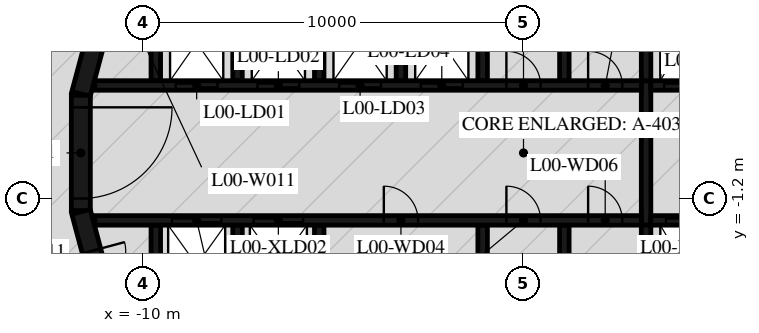
"""IFC4 building model, lengths in metres.
Left out: names, types, materials, properties, quantities, classifications, styles, units other than length and angle.
Written with IfcOpenShell. Run it as: python <this file> out.ifc"""

import sys

from ifc_helpers import new_model, si_unit, direction, frame, frame_2d, origin, place, context, subcontext, project, spatial, polyline, rectangle, outline, extrude, element, fill, save


model = new_model("IFC4")
c1 = context("Model", 3, precision=1e-05, world=origin(), true_north=direction((0.0, 1.0)))
c2 = subcontext(c1, "Body", "Model", "MODEL_VIEW")
j1 = project(units=[si_unit("LENGTHUNIT", "METRE"), si_unit("PLANEANGLEUNIT", "RADIAN")], contexts=[c1])
p1 = place(None, origin())
s1 = spatial("IfcSite", under=j1, at=p1, CompositionType="ELEMENT")
p2 = place(p1, origin())
s2 = spatial("IfcBuilding", under=s1, at=p2, CompositionType="ELEMENT")
p3 = place(p2, origin())
s3 = spatial("IfcBuildingStorey", under=s2, at=p3, CompositionType="ELEMENT", Elevation=0.0)
p4 = place(p3, frame((-10.858, 4.479, 0.0), z_axis=(0.0, 0.0, 1.0), x_axis=(-0.258734743916, -0.965948410781, 0.0)))
e1 = element("IfcWall", 1, at=p4, inside=s3, PredefinedType="SHEAR", context=c2, shape_type="SweptSolid", body=[
    extrude(rectangle(XDim=3.033, YDim=0.5, at=frame_2d((1.516, 0.0))), origin(), (0.0, 0.0, 1.0), 8.62),
])
p5 = place(p3, frame((-11.647, 1.516, 0.0), z_axis=(0.0, 0.0, 1.0), x_axis=(0.0, -1.0, 0.0)))
e2 = element("IfcWall", 2, at=p5, inside=s3, PredefinedType="SHEAR", context=c2, shape_type="SweptSolid", body=[
    extrude(rectangle(XDim=3.033, YDim=0.5, at=frame_2d((1.516, 0.0))), origin(), (0.0, 0.0, 1.0), 8.62),
])
p6 = place(p5, frame((0.316, 0.0, 0.0)))
e3 = element("IfcOpeningElement", 3, at=p6, cuts=e2, PredefinedType="OPENING", context=c2, shape_type="SweptSolid", body=[
    extrude(rectangle(XDim=2.4, YDim=2.1, at=frame_2d((1.2, 1.05))), frame((0.0, 0.26, 0.0), z_axis=(0.0, -1.0, 0.0), x_axis=(1.0, 0.0, 0.0)), (0.0, 0.0, 1.0), 0.52),
])
p7 = place(p3, frame((-11.643, -1.55, 0.0), z_axis=(0.0, 0.0, 1.0), x_axis=(0.258734743916, -0.965948410781, 0.0)))
e4 = element("IfcWall", 4, at=p7, inside=s3, PredefinedType="SHEAR", context=c2, shape_type="SweptSolid", body=[
    extrude(rectangle(XDim=3.033, YDim=0.5, at=frame_2d((1.516, 0.0))), origin(), (0.0, 0.0, 1.0), 8.62),
])
p8 = place(p7, frame((1.066, 0.0, 0.0)))
e5 = element("IfcOpeningElement", 5, at=p8, cuts=e4, PredefinedType="OPENING", context=c2, shape_type="SweptSolid", body=[
    extrude(rectangle(XDim=0.9, YDim=2.1, at=frame_2d((0.45, 1.05))), frame((0.0, 0.26, 0.0), z_axis=(0.0, -1.0, 0.0), x_axis=(1.0, 0.0, 0.0)), (0.0, 0.0, 1.0), 0.52),
])
p9 = place(p3, origin())
e6 = element("IfcWall", 6, at=p9, inside=s3, PredefinedType="SHEAR", context=c2, shape_type="SweptSolid", body=[
    extrude(outline(polyline([(-9.55, 4.8), (-7.65, 4.8), (-7.65, 1.9), (-7.4, 1.9), (-7.4, 4.8), (-5.5, 4.8), (-5.5, 1.9), (-5.25, 1.9), (-5.25, 4.8), (-3.35, 4.8), (-3.35, 1.9), (-3.1, 1.9), (-3.1, 4.8), (-1.2, 4.8), (-1.2, 1.9), (-0.95, 1.9), (-0.95, 4.8), (0.95, 4.8), (0.95, 1.9), (1.2, 1.9), (1.2, 4.8), (3.1, 4.8), (3.1, 1.9), (3.35, 1.9), (3.35, 4.8), (5.25, 4.8), (5.25, 1.9), (5.5, 1.9), (5.5, 4.8), (7.4, 4.8), (7.4, 1.9), (7.65, 1.9), (7.65, 4.8), (9.55, 4.8), (9.55, 1.9), (9.8, 1.9), (9.8, 4.8), (9.8, 5.05), (-9.8, 5.05), (-9.8, 4.8), (-9.8, 1.9), (-9.55, 1.9), (-9.55, 4.8)])), origin(), (0.0, 0.0, 1.0), 8.62),
])
p10 = place(p3, origin())
e7 = element("IfcWall", 7, at=p10, inside=s3, PredefinedType="SHEAR", context=c2, shape_type="SweptSolid", body=[
    extrude(outline(polyline([(9.8, -5.05), (9.8, -4.8), (9.8, -1.9), (9.55, -1.9), (9.55, -4.8), (7.65, -4.8), (7.65, -1.9), (7.4, -1.9), (7.4, -4.8), (5.5, -4.8), (5.5, -1.9), (5.25, -1.9), (5.25, -4.8), (3.35, -4.8), (3.35, -1.9), (3.1, -1.9), (3.1, -4.8), (1.2, -4.8), (1.2, -1.9), (0.95, -1.9), (0.95, -4.8), (-0.95, -4.8), (-0.95, -1.9), (-1.2, -1.9), (-1.2, -4.8), (-5.25, -4.8), (-5.25, -1.9), (-5.5, -1.9), (-5.5, -4.8), (-7.4, -4.8), (-7.4, -1.9), (-7.65, -1.9), (-7.65, -4.8), (-9.55, -4.8), (-9.55, -1.9), (-9.8, -1.9), (-9.8, -4.8), (-9.8, -5.05), (9.8, -5.05)])), origin(), (0.0, 0.0, 1.0), 8.62),
])
p11 = place(p3, frame((-11.28, 1.775, 0.0), z_axis=(0.0, 0.0, 1.0), x_axis=(1.0, 0.0, 0.0)))
e8 = element("IfcWall", 8, at=p11, inside=s3, PredefinedType="SHEAR", context=c2, shape_type="SweptSolid", body=[
    extrude(rectangle(XDim=14.38, YDim=0.25, at=frame_2d((7.19, 0.0))), origin(), (0.0, 0.0, 1.0), 8.62),
])
p12 = place(p11, frame((2.13, 0.0, 0.0)))
e9 = element("IfcOpeningElement", 9, at=p12, cuts=e8, PredefinedType="OPENING", context=c2, shape_type="SweptSolid", body=[
    extrude(rectangle(XDim=1.1, YDim=2.1, at=frame_2d((0.55, 1.05))), frame((0.0, 0.135, 0.0), z_axis=(0.0, -1.0, 0.0), x_axis=(1.0, 0.0, 0.0)), (0.0, 0.0, 1.0), 0.27),
])
p13 = place(p11, frame((4.28, 0.0, 0.0)))
e10 = element("IfcOpeningElement", 10, at=p13, cuts=e8, PredefinedType="OPENING", context=c2, shape_type="SweptSolid", body=[
    extrude(rectangle(XDim=1.1, YDim=2.1, at=frame_2d((0.55, 1.05))), frame((0.0, 0.135, 0.0), z_axis=(0.0, -1.0, 0.0), x_axis=(1.0, 0.0, 0.0)), (0.0, 0.0, 1.0), 0.27),
])
p14 = place(p11, frame((6.43, 0.0, 0.0)))
e11 = element("IfcOpeningElement", 11, at=p14, cuts=e8, PredefinedType="OPENING", context=c2, shape_type="SweptSolid", body=[
    extrude(rectangle(XDim=1.1, YDim=2.1, at=frame_2d((0.55, 1.05))), frame((0.0, 0.135, 0.0), z_axis=(0.0, -1.0, 0.0), x_axis=(1.0, 0.0, 0.0)), (0.0, 0.0, 1.0), 0.27),
])
p15 = place(p11, frame((8.58, 0.0, 0.0)))
e12 = element("IfcOpeningElement", 12, at=p15, cuts=e8, PredefinedType="OPENING", context=c2, shape_type="SweptSolid", body=[
    extrude(rectangle(XDim=1.1, YDim=2.1, at=frame_2d((0.55, 1.05))), frame((0.0, 0.135, 0.0), z_axis=(0.0, -1.0, 0.0), x_axis=(1.0, 0.0, 0.0)), (0.0, 0.0, 1.0), 0.27),
])
p16 = place(p11, frame((10.83, 0.0, 0.0)))
e13 = element("IfcOpeningElement", 13, at=p16, cuts=e8, PredefinedType="OPENING", context=c2, shape_type="SweptSolid", body=[
    extrude(rectangle(XDim=0.9, YDim=2.1, at=frame_2d((0.45, 1.05))), frame((0.0, 0.135, 0.0), z_axis=(0.0, -1.0, 0.0), x_axis=(1.0, 0.0, 0.0)), (0.0, 0.0, 1.0), 0.27),
])
p17 = place(p11, frame((12.98, 0.0, 0.0)))
e14 = element("IfcOpeningElement", 14, at=p17, cuts=e8, PredefinedType="OPENING", context=c2, shape_type="SweptSolid", body=[
    extrude(rectangle(XDim=0.9, YDim=2.1, at=frame_2d((0.45, 1.05))), frame((0.0, 0.135, 0.0), z_axis=(0.0, -1.0, 0.0), x_axis=(1.0, 0.0, 0.0)), (0.0, 0.0, 1.0), 0.27),
])
p18 = place(p3, frame((3.35, 1.775, 0.0), z_axis=(0.0, 0.0, 1.0), x_axis=(1.0, 0.0, 0.0)))
e15 = element("IfcWall", 15, at=p18, inside=s3, PredefinedType="SHEAR", context=c2, shape_type="SweptSolid", body=[
    extrude(rectangle(XDim=7.93, YDim=0.25, at=frame_2d((3.965, 0.0))), origin(), (0.0, 0.0, 1.0), 8.62),
])
p19 = place(p18, frame((0.35, 0.0, 0.0)))
e16 = element("IfcOpeningElement", 16, at=p19, cuts=e15, PredefinedType="OPENING", context=c2, shape_type="SweptSolid", body=[
    extrude(rectangle(XDim=1.2, YDim=2.4, at=frame_2d((0.6, 1.2))), frame((0.0, 0.135, 0.0), z_axis=(0.0, -1.0, 0.0), x_axis=(1.0, 0.0, 0.0)), (0.0, 0.0, 1.0), 0.27),
])
p20 = place(p18, frame((2.5, 0.0, 0.0)))
e17 = element("IfcOpeningElement", 17, at=p20, cuts=e15, PredefinedType="OPENING", context=c2, shape_type="SweptSolid", body=[
    extrude(rectangle(XDim=1.2, YDim=2.4, at=frame_2d((0.6, 1.2))), frame((0.0, 0.135, 0.0), z_axis=(0.0, -1.0, 0.0), x_axis=(1.0, 0.0, 0.0)), (0.0, 0.0, 1.0), 0.27),
])
p21 = place(p18, frame((4.8, 0.0, 0.0)))
e18 = element("IfcOpeningElement", 18, at=p21, cuts=e15, PredefinedType="OPENING", context=c2, shape_type="SweptSolid", body=[
    extrude(rectangle(XDim=0.9, YDim=2.1, at=frame_2d((0.45, 1.05))), frame((0.0, 0.135, 0.0), z_axis=(0.0, -1.0, 0.0), x_axis=(1.0, 0.0, 0.0)), (0.0, 0.0, 1.0), 0.27),
])
p22 = place(p3, frame((-11.28, -1.775, 0.0), z_axis=(0.0, 0.0, 1.0), x_axis=(1.0, 0.0, 0.0)))
e19 = element("IfcWall", 19, at=p22, inside=s3, PredefinedType="SHEAR", context=c2, shape_type="SweptSolid", body=[
    extrude(rectangle(XDim=14.38, YDim=0.25, at=frame_2d((7.19, 0.0))), origin(), (0.0, 0.0, 1.0), 8.62),
])
p23 = place(p22, frame((2.03, 0.0, 0.0)))
e20 = element("IfcOpeningElement", 20, at=p23, cuts=e19, PredefinedType="OPENING", context=c2, shape_type="SweptSolid", body=[
    extrude(rectangle(XDim=1.3, YDim=2.1, at=frame_2d((0.65, 1.05))), frame((0.0, 0.135, 0.0), z_axis=(0.0, -1.0, 0.0), x_axis=(1.0, 0.0, 0.0)), (0.0, 0.0, 1.0), 0.27),
])
p24 = place(p22, frame((4.18, 0.0, 0.0)))
e21 = element("IfcOpeningElement", 21, at=p24, cuts=e19, PredefinedType="OPENING", context=c2, shape_type="SweptSolid", body=[
    extrude(rectangle(XDim=1.3, YDim=2.1, at=frame_2d((0.65, 1.05))), frame((0.0, 0.135, 0.0), z_axis=(0.0, -1.0, 0.0), x_axis=(1.0, 0.0, 0.0)), (0.0, 0.0, 1.0), 0.27),
])
p25 = place(p22, frame((7.605, 0.0, 0.0)))
e22 = element("IfcOpeningElement", 22, at=p25, cuts=e19, PredefinedType="OPENING", context=c2, shape_type="SweptSolid", body=[
    extrude(rectangle(XDim=0.9, YDim=2.1, at=frame_2d((0.45, 1.05))), frame((0.0, 0.135, 0.0), z_axis=(0.0, -1.0, 0.0), x_axis=(1.0, 0.0, 0.0)), (0.0, 0.0, 1.0), 0.27),
])
p26 = place(p22, frame((10.83, 0.0, 0.0)))
e23 = element("IfcOpeningElement", 23, at=p26, cuts=e19, PredefinedType="OPENING", context=c2, shape_type="SweptSolid", body=[
    extrude(rectangle(XDim=0.9, YDim=2.1, at=frame_2d((0.45, 1.05))), frame((0.0, 0.135, 0.0), z_axis=(0.0, -1.0, 0.0), x_axis=(1.0, 0.0, 0.0)), (0.0, 0.0, 1.0), 0.27),
])
p27 = place(p22, frame((12.98, 0.0, 0.0)))
e24 = element("IfcOpeningElement", 24, at=p27, cuts=e19, PredefinedType="OPENING", context=c2, shape_type="SweptSolid", body=[
    extrude(rectangle(XDim=0.9, YDim=2.1, at=frame_2d((0.45, 1.05))), frame((0.0, 0.135, 0.0), z_axis=(0.0, -1.0, 0.0), x_axis=(1.0, 0.0, 0.0)), (0.0, 0.0, 1.0), 0.27),
])
p28 = place(p3, frame((3.35, -1.775, 0.0), z_axis=(0.0, 0.0, 1.0), x_axis=(1.0, 0.0, 0.0)))
e25 = element("IfcWall", 25, at=p28, inside=s3, PredefinedType="SHEAR", context=c2, shape_type="SweptSolid", body=[
    extrude(rectangle(XDim=7.93, YDim=0.25, at=frame_2d((3.965, 0.0))), origin(), (0.0, 0.0, 1.0), 8.62),
])
p29 = place(p28, frame((0.4, 0.0, 0.0)))
e26 = element("IfcOpeningElement", 26, at=p29, cuts=e25, PredefinedType="OPENING", context=c2, shape_type="SweptSolid", body=[
    extrude(rectangle(XDim=1.1, YDim=2.4, at=frame_2d((0.55, 1.2))), frame((0.0, 0.135, 0.0), z_axis=(0.0, -1.0, 0.0), x_axis=(1.0, 0.0, 0.0)), (0.0, 0.0, 1.0), 0.27),
])
p30 = place(p28, frame((2.55, 0.0, 0.0)))
e27 = element("IfcOpeningElement", 27, at=p30, cuts=e25, PredefinedType="OPENING", context=c2, shape_type="SweptSolid", body=[
    extrude(rectangle(XDim=1.1, YDim=2.4, at=frame_2d((0.55, 1.2))), frame((0.0, 0.135, 0.0), z_axis=(0.0, -1.0, 0.0), x_axis=(1.0, 0.0, 0.0)), (0.0, 0.0, 1.0), 0.27),
])
p31 = place(p28, frame((4.7, 0.0, 0.0)))
e28 = element("IfcOpeningElement", 28, at=p31, cuts=e25, PredefinedType="OPENING", context=c2, shape_type="SweptSolid", body=[
    extrude(rectangle(XDim=1.1, YDim=2.4, at=frame_2d((0.55, 1.2))), frame((0.0, 0.135, 0.0), z_axis=(0.0, -1.0, 0.0), x_axis=(1.0, 0.0, 0.0)), (0.0, 0.0, 1.0), 0.27),
])
p32 = place(p3, frame((3.225, -1.9, 0.0), z_axis=(0.0, 0.0, 1.0), x_axis=(0.0, 1.0, 0.0)))
e29 = element("IfcWall", 29, at=p32, inside=s3, PredefinedType="SHEAR", context=c2, shape_type="SweptSolid", body=[
    extrude(rectangle(XDim=3.8, YDim=0.25, at=frame_2d((1.9, 0.0))), origin(), (0.0, 0.0, 1.0), 8.62),
])
p33 = place(p6, origin())
e30 = element("IfcDoor", 30, at=p33, inside=s3, OperationType="DOUBLE_DOOR_SINGLE_SWING", PredefinedType="DOOR", context=c2, shape_type="SweptSolid", body=[
    extrude(rectangle(XDim=2.4, YDim=2.1, at=frame_2d((1.2, 1.05))), frame((0.0, 0.025, 0.0), z_axis=(0.0, -1.0, 0.0), x_axis=(1.0, 0.0, 0.0)), (0.0, 0.0, 1.0), 0.05),
])
fill(e3, e30)
p34 = place(p12, origin())
e31 = element("IfcDoor", 31, at=p34, inside=s3, OperationType="DOUBLE_DOOR_SLIDING", PredefinedType="DOOR", context=c2, shape_type="SweptSolid", body=[
    extrude(rectangle(XDim=1.1, YDim=2.1, at=frame_2d((0.55, 1.05))), frame((0.0, 0.025, 0.0), z_axis=(0.0, -1.0, 0.0), x_axis=(1.0, 0.0, 0.0)), (0.0, 0.0, 1.0), 0.05),
])
fill(e9, e31)
p35 = place(p13, origin())
e32 = element("IfcDoor", 32, at=p35, inside=s3, OperationType="DOUBLE_DOOR_SLIDING", PredefinedType="DOOR", context=c2, shape_type="SweptSolid", body=[
    extrude(rectangle(XDim=1.1, YDim=2.1, at=frame_2d((0.55, 1.05))), frame((0.0, 0.025, 0.0), z_axis=(0.0, -1.0, 0.0), x_axis=(1.0, 0.0, 0.0)), (0.0, 0.0, 1.0), 0.05),
])
fill(e10, e32)
p36 = place(p14, origin())
e33 = element("IfcDoor", 33, at=p36, inside=s3, OperationType="DOUBLE_DOOR_SLIDING", PredefinedType="DOOR", context=c2, shape_type="SweptSolid", body=[
    extrude(rectangle(XDim=1.1, YDim=2.1, at=frame_2d((0.55, 1.05))), frame((0.0, 0.025, 0.0), z_axis=(0.0, -1.0, 0.0), x_axis=(1.0, 0.0, 0.0)), (0.0, 0.0, 1.0), 0.05),
])
fill(e11, e33)
p37 = place(p15, origin())
e34 = element("IfcDoor", 34, at=p37, inside=s3, OperationType="DOUBLE_DOOR_SLIDING", PredefinedType="DOOR", context=c2, shape_type="SweptSolid", body=[
    extrude(rectangle(XDim=1.1, YDim=2.1, at=frame_2d((0.55, 1.05))), frame((0.0, 0.025, 0.0), z_axis=(0.0, -1.0, 0.0), x_axis=(1.0, 0.0, 0.0)), (0.0, 0.0, 1.0), 0.05),
])
fill(e12, e34)
p38 = place(p19, origin())
e35 = element("IfcDoor", 35, at=p38, inside=s3, OperationType="DOUBLE_DOOR_SLIDING", PredefinedType="DOOR", context=c2, shape_type="SweptSolid", body=[
    extrude(rectangle(XDim=1.2, YDim=2.4, at=frame_2d((0.6, 1.2))), frame((0.0, 0.025, 0.0), z_axis=(0.0, -1.0, 0.0), x_axis=(1.0, 0.0, 0.0)), (0.0, 0.0, 1.0), 0.05),
])
fill(e16, e35)
p39 = place(p23, origin())
e36 = element("IfcDoor", 36, at=p39, inside=s3, OperationType="DOUBLE_DOOR_SLIDING", PredefinedType="DOOR", context=c2, shape_type="SweptSolid", body=[
    extrude(rectangle(XDim=1.3, YDim=2.1, at=frame_2d((0.65, 1.05))), frame((0.0, 0.025, 0.0), z_axis=(0.0, -1.0, 0.0), x_axis=(1.0, 0.0, 0.0)), (0.0, 0.0, 1.0), 0.05),
])
fill(e20, e36)
p40 = place(p24, origin())
e37 = element("IfcDoor", 37, at=p40, inside=s3, OperationType="DOUBLE_DOOR_SLIDING", PredefinedType="DOOR", context=c2, shape_type="SweptSolid", body=[
    extrude(rectangle(XDim=1.3, YDim=2.1, at=frame_2d((0.65, 1.05))), frame((0.0, 0.025, 0.0), z_axis=(0.0, -1.0, 0.0), x_axis=(1.0, 0.0, 0.0)), (0.0, 0.0, 1.0), 0.05),
])
fill(e21, e37)
p41 = place(p29, origin())
e38 = element("IfcDoor", 38, at=p41, inside=s3, OperationType="DOUBLE_DOOR_SLIDING", PredefinedType="DOOR", context=c2, shape_type="SweptSolid", body=[
    extrude(rectangle(XDim=1.1, YDim=2.4, at=frame_2d((0.55, 1.2))), frame((0.0, 0.025, 0.0), z_axis=(0.0, -1.0, 0.0), x_axis=(1.0, 0.0, 0.0)), (0.0, 0.0, 1.0), 0.05),
])
fill(e26, e38)
p42 = place(p16, origin())
e39 = element("IfcDoor", 39, at=p42, inside=s3, OperationType="SINGLE_SWING_RIGHT", PredefinedType="DOOR", context=c2, shape_type="SweptSolid", body=[
    extrude(rectangle(XDim=0.9, YDim=2.1, at=frame_2d((0.45, 1.05))), frame((0.0, 0.025, 0.0), z_axis=(0.0, -1.0, 0.0), x_axis=(1.0, 0.0, 0.0)), (0.0, 0.0, 1.0), 0.05),
])
fill(e13, e39)
p43 = place(p17, origin())
e40 = element("IfcDoor", 40, at=p43, inside=s3, OperationType="SINGLE_SWING_LEFT", PredefinedType="DOOR", context=c2, shape_type="SweptSolid", body=[
    extrude(rectangle(XDim=0.9, YDim=2.1, at=frame_2d((0.45, 1.05))), frame((0.0, 0.025, 0.0), z_axis=(0.0, -1.0, 0.0), x_axis=(1.0, 0.0, 0.0)), (0.0, 0.0, 1.0), 0.05),
])
fill(e14, e40)
p44 = place(p25, origin())
e41 = element("IfcDoor", 41, at=p44, inside=s3, OperationType="SINGLE_SWING_LEFT", PredefinedType="DOOR", context=c2, shape_type="SweptSolid", body=[
    extrude(rectangle(XDim=0.9, YDim=2.1, at=frame_2d((0.45, 1.05))), frame((0.0, 0.025, 0.0), z_axis=(0.0, -1.0, 0.0), x_axis=(1.0, 0.0, 0.0)), (0.0, 0.0, 1.0), 0.05),
])
fill(e22, e41)
p45 = place(p26, origin())
e42 = element("IfcDoor", 42, at=p45, inside=s3, OperationType="SINGLE_SWING_RIGHT", PredefinedType="DOOR", context=c2, shape_type="SweptSolid", body=[
    extrude(rectangle(XDim=0.9, YDim=2.1, at=frame_2d((0.45, 1.05))), frame((0.0, 0.025, 0.0), z_axis=(0.0, -1.0, 0.0), x_axis=(1.0, 0.0, 0.0)), (0.0, 0.0, 1.0), 0.05),
])
fill(e23, e42)
p46 = place(p27, origin())
e43 = element("IfcDoor", 43, at=p46, inside=s3, OperationType="SINGLE_SWING_LEFT", PredefinedType="DOOR", context=c2, shape_type="SweptSolid", body=[
    extrude(rectangle(XDim=0.9, YDim=2.1, at=frame_2d((0.45, 1.05))), frame((0.0, 0.025, 0.0), z_axis=(0.0, -1.0, 0.0), x_axis=(1.0, 0.0, 0.0)), (0.0, 0.0, 1.0), 0.05),
])
fill(e24, e43)
p47 = place(p8, origin())
e44 = element("IfcDoor", 44, at=p47, inside=s3, OperationType="SINGLE_SWING_RIGHT", PredefinedType="DOOR", context=c2, shape_type="SweptSolid", body=[
    extrude(rectangle(XDim=0.9, YDim=2.1, at=frame_2d((0.45, 1.05))), frame((0.0, 0.025, 0.0), z_axis=(0.0, -1.0, 0.0), x_axis=(1.0, 0.0, 0.0)), (0.0, 0.0, 1.0), 0.05),
])
fill(e5, e44)
save(model, sys.argv[1])
